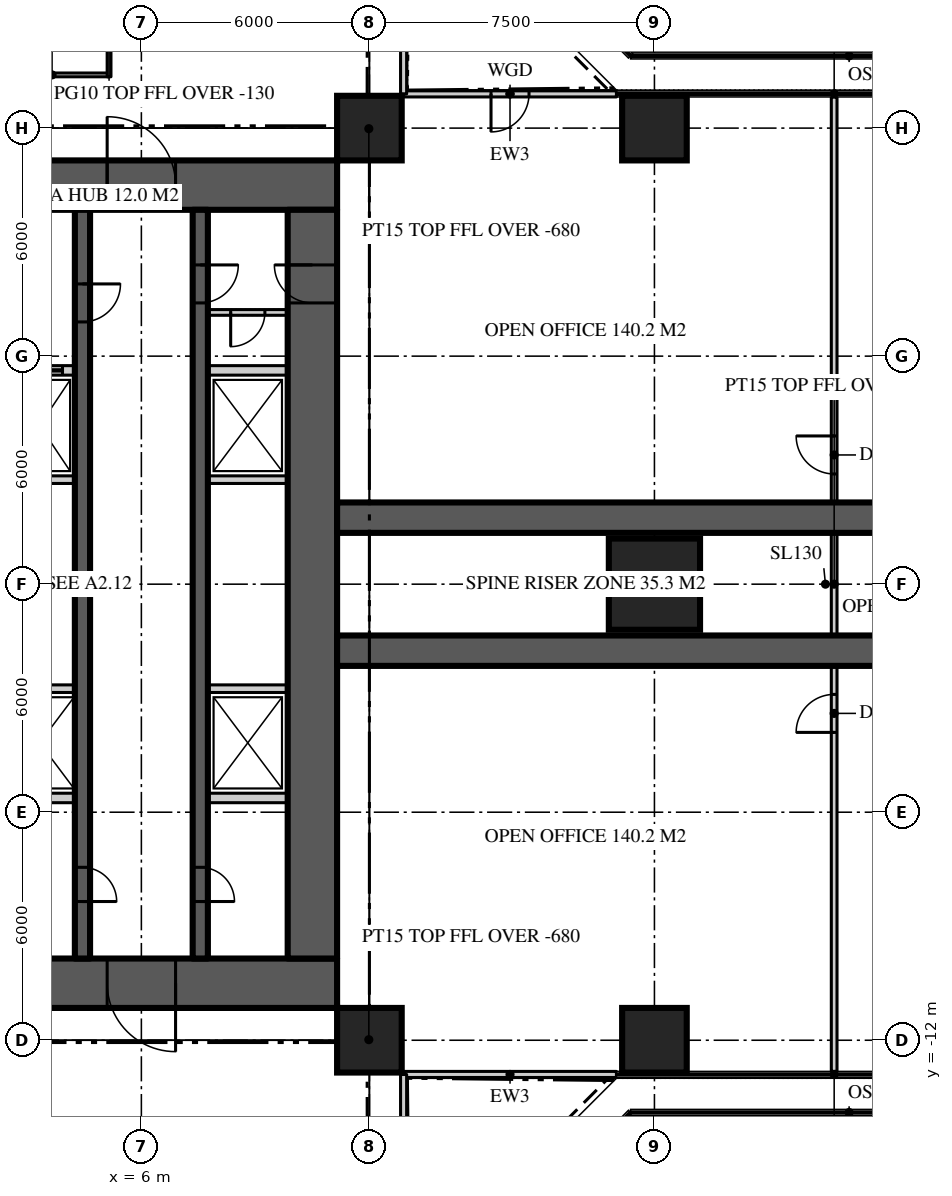
"""IFC4 building model, lengths in metres.
Left out: names, types, materials, properties, quantities, classifications, styles, units other than length and angle.
Written with IfcOpenShell. Run it as: python <this file> out.ifc"""

import sys

from ifc_helpers import new_model, si_unit, direction, frame, frame_2d, origin, origin_2d, place, context, subcontext, project, spatial, rectangle, extrude, element, fill, save


model = new_model("IFC4")
c1 = context("Model", 3, precision=1e-05, world=origin(), true_north=direction((0.0, 1.0)))
c2 = subcontext(c1, "Body", "Model", "MODEL_VIEW")
j1 = project(units=[si_unit("LENGTHUNIT", "METRE"), si_unit("PLANEANGLEUNIT", "RADIAN")], contexts=[c1])
p1 = place(None, origin())
s1 = spatial("IfcSite", under=j1, at=p1, CompositionType="ELEMENT")
p2 = place(p1, origin())
s2 = spatial("IfcBuilding", under=s1, at=p2, CompositionType="ELEMENT")
p3 = place(p2, frame((0.0, 0.0, 70.8)))
s3 = spatial("IfcBuildingStorey", under=s2, at=p3, CompositionType="ELEMENT", Elevation=70.8)
p4 = place(p3, frame((-11.15, 10.5, 0.0), z_axis=(0.0, 0.0, 1.0), x_axis=(1.0, 0.0, 0.0)))
e1 = element("IfcWall", 1, at=p4, inside=s3, PredefinedType="SHEAR", context=c2, shape_type="SweptSolid", body=[
    extrude(rectangle(XDim=22.3, YDim=1.3, at=frame_2d((11.15, 0.0))), origin(), (0.0, 0.0, 1.0), 3.9),
])
p5 = place(p4, frame((4.25, 0.0, 0.0)))
e2 = element("IfcOpeningElement", 2, at=p5, cuts=e1, PredefinedType="OPENING", context=c2, shape_type="SweptSolid", body=[
    extrude(rectangle(XDim=1.8, YDim=2.2, at=frame_2d((0.9, 1.1))), frame((0.0, 0.66, 0.0), z_axis=(0.0, -1.0, 0.0), x_axis=(1.0, 0.0, 0.0)), (0.0, 0.0, 1.0), 1.32),
])
p6 = place(p4, frame((16.25, 0.0, 0.0)))
e3 = element("IfcOpeningElement", 3, at=p6, cuts=e1, PredefinedType="OPENING", context=c2, shape_type="SweptSolid", body=[
    extrude(rectangle(XDim=1.8, YDim=2.2, at=frame_2d((0.9, 1.1))), frame((0.0, 0.66, 0.0), z_axis=(0.0, -1.0, 0.0), x_axis=(1.0, 0.0, 0.0)), (0.0, 0.0, 1.0), 1.32),
])
p7 = place(p3, frame((11.15, -10.5, 0.0), z_axis=(0.0, 0.0, 1.0), x_axis=(-1.0, 0.0, 0.0)))
e4 = element("IfcWall", 4, at=p7, inside=s3, PredefinedType="SHEAR", context=c2, shape_type="SweptSolid", body=[
    extrude(rectangle(XDim=22.3, YDim=1.3, at=frame_2d((11.15, 0.0))), origin(), (0.0, 0.0, 1.0), 3.9),
])
p8 = place(p7, frame((16.25, 0.0, 0.0)))
e5 = element("IfcOpeningElement", 5, at=p8, cuts=e4, PredefinedType="OPENING", context=c2, shape_type="SweptSolid", body=[
    extrude(rectangle(XDim=1.8, YDim=2.2, at=frame_2d((0.9, 1.1))), frame((0.0, 0.66, 0.0), z_axis=(0.0, -1.0, 0.0), x_axis=(1.0, 0.0, 0.0)), (0.0, 0.0, 1.0), 1.32),
])
p9 = place(p7, frame((4.25, 0.0, 0.0)))
e6 = element("IfcOpeningElement", 6, at=p9, cuts=e4, PredefinedType="OPENING", context=c2, shape_type="SweptSolid", body=[
    extrude(rectangle(XDim=1.8, YDim=2.2, at=frame_2d((0.9, 1.1))), frame((0.0, 0.66, 0.0), z_axis=(0.0, -1.0, 0.0), x_axis=(1.0, 0.0, 0.0)), (0.0, 0.0, 1.0), 1.32),
])
p10 = place(p3, frame((10.5, -9.85, 0.0), z_axis=(0.0, 0.0, 1.0), x_axis=(0.0, 1.0, 0.0)))
e7 = element("IfcWall", 7, at=p10, inside=s3, PredefinedType="SHEAR", context=c2, shape_type="SweptSolid", body=[
    extrude(rectangle(XDim=19.7, YDim=1.3, at=frame_2d((9.85, 0.0))), origin(), (0.0, 0.0, 1.0), 3.9),
])
p11 = place(p10, frame((17.25, 0.0, 0.0)))
e8 = element("IfcOpeningElement", 8, at=p11, cuts=e7, PredefinedType="OPENING", context=c2, shape_type="SweptSolid", body=[
    extrude(rectangle(XDim=1.0, YDim=2.2, at=frame_2d((0.5, 1.1))), frame((0.0, 0.66, 0.0), z_axis=(0.0, -1.0, 0.0), x_axis=(1.0, 0.0, 0.0)), (0.0, 0.0, 1.0), 1.32),
])
for number, where, z_axis, x_axis in (
    (9, (11.15, -1.75, 0.0), (0.0, 0.0, 1.0), (1.0, 0.0, 0.0)),
    (10, (11.15, 1.75, 0.0), (0.0, 0.0, 1.0), (1.0, 0.0, 0.0)),
):
    element("IfcWall", number, at=place(p3, frame(where, z_axis=z_axis, x_axis=x_axis)), inside=s3, PredefinedType="SHEAR", context=c2, shape_type="SweptSolid", body=[
        extrude(rectangle(XDim=15.25, YDim=0.8, at=frame_2d((7.625, 0.0))), origin(), (0.0, 0.0, 1.0), 3.9),
    ])
for number, where, z_axis, x_axis in (
    (11, (12.0, -12.0, 0.0), (0.0, 0.0, 1.0), (1.0, 0.0, 0.0)),
    (12, (19.5, -12.0, 0.0), (0.0, 0.0, 1.0), (1.0, 0.0, 0.0)),
):
    element("IfcColumn", number, at=place(p3, frame(where, z_axis=z_axis, x_axis=x_axis)), inside=s3, PredefinedType="COLUMN", context=c2, shape_type="SweptSolid", body=[
        extrude(rectangle(XDim=1.7, YDim=1.7, at=origin_2d()), origin(), (0.0, 0.0, 1.0), 3.9),
    ])
p12 = place(p3, frame((19.5, 0.0, 0.0), z_axis=(0.0, 0.0, 1.0), x_axis=(1.0, 0.0, 0.0)))
e13 = element("IfcColumn", 13, at=p12, inside=s3, PredefinedType="COLUMN", context=c2, shape_type="SweptSolid", body=[
    extrude(rectangle(XDim=2.4, YDim=2.4, at=origin_2d()), origin(), (0.0, 0.0, 1.0), 3.9),
])
for number, where, z_axis, x_axis in (
    (14, (12.0, 12.0, 0.0), (0.0, 0.0, 1.0), (1.0, 0.0, 0.0)),
    (15, (19.5, 12.0, 0.0), (0.0, 0.0, 1.0), (1.0, 0.0, 0.0)),
):
    element("IfcColumn", number, at=place(p3, frame(where, z_axis=z_axis, x_axis=x_axis)), inside=s3, PredefinedType="COLUMN", context=c2, shape_type="SweptSolid", body=[
        extrude(rectangle(XDim=1.7, YDim=1.7, at=origin_2d()), origin(), (0.0, 0.0, 1.0), 3.9),
    ])
p13 = place(p3, frame((12.9, -12.9, 0.0), z_axis=(0.0, 0.0, 1.0), x_axis=(1.0, 0.0, 0.0)))
e16 = element("IfcWall", 16, at=p13, inside=s3, PredefinedType="SOLIDWALL", context=c2, shape_type="SweptSolid", body=[
    extrude(rectangle(XDim=5.6, YDim=0.16, at=frame_2d((2.8, 0.0))), origin(), (0.0, 0.0, 1.0), 3.77),
])
p14 = place(p3, frame((18.5, 12.9, 0.0), z_axis=(0.0, 0.0, 1.0), x_axis=(-1.0, 0.0, 0.0)))
e17 = element("IfcWall", 17, at=p14, inside=s3, PredefinedType="SOLIDWALL", context=c2, shape_type="SweptSolid", body=[
    extrude(rectangle(XDim=5.6, YDim=0.16, at=frame_2d((2.8, 0.0))), origin(), (0.0, 0.0, 1.0), 3.77),
])
p15 = place(p14, frame((2.3, 0.0, 0.0)))
e18 = element("IfcOpeningElement", 18, at=p15, cuts=e17, PredefinedType="OPENING", context=c2, shape_type="SweptSolid", body=[
    extrude(rectangle(XDim=1.0, YDim=2.2, at=frame_2d((0.5, 1.1))), frame((0.0, 0.09, 0.0), z_axis=(0.0, -1.0, 0.0), x_axis=(1.0, 0.0, 0.0)), (0.0, 0.0, 1.0), 0.18),
])
p16 = place(p3, frame((12.9, 12.9, 0.0), z_axis=(0.0, 0.0, 1.0), x_axis=(0.0, 1.0, 0.0)))
e19 = element("IfcWall", 19, at=p16, inside=s3, PredefinedType="SOLIDWALL", context=c2, shape_type="SweptSolid", body=[
    extrude(rectangle(XDim=5.6, YDim=0.16, at=frame_2d((2.8, 0.0))), origin(), (0.0, 0.0, 1.0), 3.77),
])
p17 = place(p3, frame((12.9, -18.5, 0.0), z_axis=(0.0, 0.0, 1.0), x_axis=(0.0, 1.0, 0.0)))
e20 = element("IfcWall", 20, at=p17, inside=s3, PredefinedType="SOLIDWALL", context=c2, shape_type="SweptSolid", body=[
    extrude(rectangle(XDim=5.6, YDim=0.16, at=frame_2d((2.8, 0.0))), origin(), (0.0, 0.0, 1.0), 3.77),
])
p18 = place(p17, frame((2.3, 0.0, 0.0)))
e21 = element("IfcOpeningElement", 21, at=p18, cuts=e20, PredefinedType="OPENING", context=c2, shape_type="SweptSolid", body=[
    extrude(rectangle(XDim=1.0, YDim=2.2, at=frame_2d((0.5, 1.1))), frame((0.0, 0.09, 0.0), z_axis=(0.0, -1.0, 0.0), x_axis=(1.0, 0.0, 0.0)), (0.0, 0.0, 1.0), 0.18),
])
p19 = place(p3, frame((7.55, 9.85, 0.0), z_axis=(0.0, 0.0, 1.0), x_axis=(0.0, -1.0, 0.0)))
e22 = element("IfcWall", 22, at=p19, inside=s3, PredefinedType="SHEAR", context=c2, shape_type="SweptSolid", body=[
    extrude(rectangle(XDim=19.7, YDim=0.4, at=frame_2d((9.85, 0.0))), origin(), (0.0, 0.0, 1.0), 3.9),
])
p20 = place(p19, frame((1.45, 0.0, 0.0)))
e23 = element("IfcOpeningElement", 23, at=p20, cuts=e22, PredefinedType="OPENING", context=c2, shape_type="SweptSolid", body=[
    extrude(rectangle(XDim=1.0, YDim=2.2, at=frame_2d((0.5, 1.1))), frame((0.0, 0.21, 0.0), z_axis=(0.0, -1.0, 0.0), x_axis=(1.0, 0.0, 0.0)), (0.0, 0.0, 1.0), 0.42),
])
p21 = place(p19, frame((17.3, 0.0, 0.0)))
e24 = element("IfcOpeningElement", 24, at=p21, cuts=e22, PredefinedType="OPENING", context=c2, shape_type="SweptSolid", body=[
    extrude(rectangle(XDim=0.9, YDim=2.1, at=frame_2d((0.45, 1.05))), frame((0.0, 0.21, 0.0), z_axis=(0.0, -1.0, 0.0), x_axis=(1.0, 0.0, 0.0)), (0.0, 0.0, 1.0), 0.42),
])
p22 = place(p3, frame((4.45, 9.85, 0.0), z_axis=(0.0, 0.0, 1.0), x_axis=(0.0, -1.0, 0.0)))
e25 = element("IfcWall", 25, at=p22, inside=s3, PredefinedType="SHEAR", context=c2, shape_type="SweptSolid", body=[
    extrude(rectangle(XDim=19.7, YDim=0.4, at=frame_2d((9.85, 0.0))), origin(), (0.0, 0.0, 1.0), 3.9),
])
p23 = place(p22, frame((1.95, 0.0, 0.0)))
e26 = element("IfcOpeningElement", 26, at=p23, cuts=e25, PredefinedType="OPENING", context=c2, shape_type="SweptSolid", body=[
    extrude(rectangle(XDim=1.0, YDim=2.2, at=frame_2d((0.5, 1.1))), frame((0.0, 0.21, 0.0), z_axis=(0.0, -1.0, 0.0), x_axis=(1.0, 0.0, 0.0)), (0.0, 0.0, 1.0), 0.42),
])
p24 = place(p22, frame((17.3, 0.0, 0.0)))
e27 = element("IfcOpeningElement", 27, at=p24, cuts=e25, PredefinedType="OPENING", context=c2, shape_type="SweptSolid", body=[
    extrude(rectangle(XDim=0.9, YDim=2.1, at=frame_2d((0.45, 1.05))), frame((0.0, 0.21, 0.0), z_axis=(0.0, -1.0, 0.0), x_axis=(1.0, 0.0, 0.0)), (0.0, 0.0, 1.0), 0.42),
])
p25 = place(p3, frame((2.4, 5.625, 0.0), z_axis=(0.0, 0.0, 1.0), x_axis=(1.0, 0.0, 0.0)))
e28 = element("IfcWall", 28, at=p25, inside=s3, PredefinedType="SOLIDWALL", context=c2, shape_type="SweptSolid", body=[
    extrude(rectangle(XDim=1.85, YDim=0.25, at=frame_2d((0.925, 0.0))), origin(), (0.0, 0.0, 1.0), 3.7),
])
p26 = place(p25, frame((0.325, 0.0, 0.0)))
e29 = element("IfcOpeningElement", 29, at=p26, cuts=e28, PredefinedType="OPENING", context=c2, shape_type="SweptSolid", body=[
    extrude(rectangle(XDim=1.2, YDim=2.2, at=frame_2d((0.6, 1.1))), frame((0.0, 0.135, 0.0), z_axis=(0.0, -1.0, 0.0), x_axis=(1.0, 0.0, 0.0)), (0.0, 0.0, 1.0), 0.27),
])
p27 = place(p3, frame((7.75, 5.625, 0.0), z_axis=(0.0, 0.0, 1.0), x_axis=(1.0, 0.0, 0.0)))
e30 = element("IfcWall", 30, at=p27, inside=s3, PredefinedType="SOLIDWALL", context=c2, shape_type="SweptSolid", body=[
    extrude(rectangle(XDim=2.1, YDim=0.25, at=frame_2d((1.05, 0.0))), origin(), (0.0, 0.0, 1.0), 3.7),
])
p28 = place(p3, frame((2.4, -5.625, 0.0), z_axis=(0.0, 0.0, 1.0), x_axis=(1.0, 0.0, 0.0)))
e31 = element("IfcWall", 31, at=p28, inside=s3, PredefinedType="SOLIDWALL", context=c2, shape_type="SweptSolid", body=[
    extrude(rectangle(XDim=1.85, YDim=0.25, at=frame_2d((0.925, 0.0))), origin(), (0.0, 0.0, 1.0), 3.7),
])
p29 = place(p3, frame((7.75, -5.625, 0.0), z_axis=(0.0, 0.0, 1.0), x_axis=(1.0, 0.0, 0.0)))
e32 = element("IfcWall", 32, at=p29, inside=s3, PredefinedType="SOLIDWALL", context=c2, shape_type="SweptSolid", body=[
    extrude(rectangle(XDim=2.1, YDim=0.25, at=frame_2d((1.05, 0.0))), origin(), (0.0, 0.0, 1.0), 3.7),
])
p30 = place(p3, frame((2.4, -2.75, 0.0), z_axis=(0.0, 0.0, 1.0), x_axis=(1.0, 0.0, 0.0)))
e33 = element("IfcWall", 33, at=p30, inside=s3, PredefinedType="SOLIDWALL", context=c2, shape_type="SweptSolid", body=[
    extrude(rectangle(XDim=1.85, YDim=0.2, at=frame_2d((0.925, 0.0))), origin(), (0.0, 0.0, 1.0), 3.7),
])
p31 = place(p3, frame((7.75, -2.75, 0.0), z_axis=(0.0, 0.0, 1.0), x_axis=(1.0, 0.0, 0.0)))
e34 = element("IfcWall", 34, at=p31, inside=s3, PredefinedType="SOLIDWALL", context=c2, shape_type="SweptSolid", body=[
    extrude(rectangle(XDim=2.1, YDim=0.2, at=frame_2d((1.05, 0.0))), origin(), (0.0, 0.0, 1.0), 3.7),
])
p32 = place(p3, frame((2.4, 2.75, 0.0), z_axis=(0.0, 0.0, 1.0), x_axis=(1.0, 0.0, 0.0)))
e35 = element("IfcWall", 35, at=p32, inside=s3, PredefinedType="SOLIDWALL", context=c2, shape_type="SweptSolid", body=[
    extrude(rectangle(XDim=1.85, YDim=0.2, at=frame_2d((0.925, 0.0))), origin(), (0.0, 0.0, 1.0), 3.7),
])
p33 = place(p3, frame((7.75, 2.75, 0.0), z_axis=(0.0, 0.0, 1.0), x_axis=(1.0, 0.0, 0.0)))
e36 = element("IfcWall", 36, at=p33, inside=s3, PredefinedType="SOLIDWALL", context=c2, shape_type="SweptSolid", body=[
    extrude(rectangle(XDim=2.1, YDim=0.2, at=frame_2d((1.05, 0.0))), origin(), (0.0, 0.0, 1.0), 3.7),
])
p34 = place(p3, frame((24.229, -12.82, 0.0), z_axis=(0.0, 0.0, 1.0), x_axis=(0.0, 1.0, 0.0)))
e37 = element("IfcWall", 37, at=p34, inside=s3, PredefinedType="PARTITIONING", context=c2, shape_type="SweptSolid", body=[
    extrude(rectangle(XDim=25.64, YDim=0.15, at=frame_2d((12.82, 0.0))), origin(), (0.0, 0.0, 1.0), 3.77),
])
p35 = place(p34, frame((15.72, 0.0, 0.0)))
e38 = element("IfcOpeningElement", 38, at=p35, cuts=e37, PredefinedType="OPENING", context=c2, shape_type="SweptSolid", body=[
    extrude(rectangle(XDim=1.0, YDim=2.2, at=frame_2d((0.5, 1.1))), frame((0.0, 0.085, 0.0), z_axis=(0.0, -1.0, 0.0), x_axis=(1.0, 0.0, 0.0)), (0.0, 0.0, 1.0), 0.17),
])
p36 = place(p34, frame((8.92, 0.0, 0.0)))
e39 = element("IfcOpeningElement", 39, at=p36, cuts=e37, PredefinedType="OPENING", context=c2, shape_type="SweptSolid", body=[
    extrude(rectangle(XDim=1.0, YDim=2.2, at=frame_2d((0.5, 1.1))), frame((0.0, 0.085, 0.0), z_axis=(0.0, -1.0, 0.0), x_axis=(1.0, 0.0, 0.0)), (0.0, 0.0, 1.0), 0.17),
])
p37 = place(p3, frame((2.15, 13.4, 0.0), z_axis=(0.0, 0.0, 1.0), x_axis=(1.0, 0.0, 0.0)))
e40 = element("IfcWall", 40, at=p37, inside=s3, PredefinedType="PARTITIONING", context=c2, shape_type="SweptSolid", body=[
    extrude(rectangle(XDim=3.0, YDim=0.1, at=frame_2d((1.5, 0.0))), origin(), (0.0, 0.0, 1.0), 3.77),
])
p38 = place(p3, frame((5.15, 13.35, 0.0), z_axis=(0.0, 0.0, 1.0), x_axis=(0.0, 1.0, 0.0)))
e41 = element("IfcWall", 41, at=p38, inside=s3, PredefinedType="PARTITIONING", context=c2, shape_type="SweptSolid", body=[
    extrude(rectangle(XDim=4.1, YDim=0.1, at=frame_2d((2.05, 0.0))), origin(), (0.0, 0.0, 1.0), 3.77),
])
p39 = place(p38, frame((1.55, 0.0, 0.0)))
e42 = element("IfcOpeningElement", 42, at=p39, cuts=e41, PredefinedType="OPENING", context=c2, shape_type="SweptSolid", body=[
    extrude(rectangle(XDim=1.0, YDim=2.2, at=frame_2d((0.5, 1.1))), frame((0.0, 0.06, 0.0), z_axis=(0.0, -1.0, 0.0), x_axis=(1.0, 0.0, 0.0)), (0.0, 0.0, 1.0), 0.12),
])
for number, where, z_axis, x_axis in (
    (43, (11.15, 11.15, 0.0), (0.0, 0.0, 1.0), (0.707, 0.707, 0.0)),
    (44, (11.15, -11.15, 0.0), (0.0, 0.0, 1.0), (0.707, -0.707, 0.0)),
):
    element("IfcWall", number, at=place(p3, frame(where, z_axis=z_axis, x_axis=x_axis)), inside=s3, PredefinedType="PARTITIONING", context=c2, shape_type="SweptSolid", body=[
        extrude(rectangle(XDim=2.362, YDim=0.15, at=frame_2d((1.181, 0.0))), origin(), (0.0, 0.0, 1.0), 3.22),
    ])
p40 = place(p3, frame((9.85, 7.15, 0.0), z_axis=(0.0, 0.0, 1.0), x_axis=(-1.0, 0.0, 0.0)))
e45 = element("IfcWall", 45, at=p40, inside=s3, PredefinedType="SOLIDWALL", context=c2, shape_type="SweptSolid", body=[
    extrude(rectangle(XDim=2.1, YDim=0.15, at=frame_2d((1.05, 0.0))), origin(), (0.0, 0.0, 1.0), 3.77),
])
p41 = place(p40, frame((0.6, 0.0, 0.0)))
e46 = element("IfcOpeningElement", 46, at=p41, cuts=e45, PredefinedType="OPENING", context=c2, shape_type="SweptSolid", body=[
    extrude(rectangle(XDim=0.9, YDim=2.1, at=frame_2d((0.45, 1.05))), frame((0.0, 0.085, 0.0), z_axis=(0.0, -1.0, 0.0), x_axis=(1.0, 0.0, 0.0)), (0.0, 0.0, 1.0), 0.17),
])
p42 = place(p15, origin())
e47 = element("IfcDoor", 47, at=p42, inside=s3, OperationType="SINGLE_SWING_RIGHT", PredefinedType="DOOR", context=c2, shape_type="SweptSolid", body=[
    extrude(rectangle(XDim=1.0, YDim=2.2, at=frame_2d((0.5, 1.1))), frame((0.0, 0.025, 0.0), z_axis=(0.0, -1.0, 0.0), x_axis=(1.0, 0.0, 0.0)), (0.0, 0.0, 1.0), 0.05),
])
fill(e18, e47)
p43 = place(p6, origin())
e48 = element("IfcDoor", 48, at=p43, inside=s3, OperationType="DOUBLE_DOOR_DOUBLE_SWING", PredefinedType="DOOR", context=c2, shape_type="SweptSolid", body=[
    extrude(rectangle(XDim=1.8, YDim=2.2, at=frame_2d((0.9, 1.1))), frame((0.0, 0.025, 0.0), z_axis=(0.0, -1.0, 0.0), x_axis=(1.0, 0.0, 0.0)), (0.0, 0.0, 1.0), 0.05),
])
fill(e3, e48)
p44 = place(p9, origin())
e49 = element("IfcDoor", 49, at=p44, inside=s3, OperationType="DOUBLE_DOOR_DOUBLE_SWING", PredefinedType="DOOR", context=c2, shape_type="SweptSolid", body=[
    extrude(rectangle(XDim=1.8, YDim=2.2, at=frame_2d((0.9, 1.1))), frame((0.0, 0.025, 0.0), z_axis=(0.0, -1.0, 0.0), x_axis=(1.0, 0.0, 0.0)), (0.0, 0.0, 1.0), 0.05),
])
fill(e6, e49)
p45 = place(p20, origin())
e50 = element("IfcDoor", 50, at=p45, inside=s3, OperationType="SINGLE_SWING_LEFT", PredefinedType="DOOR", context=c2, shape_type="SweptSolid", body=[
    extrude(rectangle(XDim=1.0, YDim=2.2, at=frame_2d((0.5, 1.1))), frame((0.0, 0.025, 0.0), z_axis=(0.0, -1.0, 0.0), x_axis=(1.0, 0.0, 0.0)), (0.0, 0.0, 1.0), 0.05),
])
fill(e23, e50)
p46 = place(p11, origin())
e51 = element("IfcDoor", 51, at=p46, inside=s3, OperationType="SINGLE_SWING_RIGHT", PredefinedType="DOOR", context=c2, shape_type="SweptSolid", body=[
    extrude(rectangle(XDim=1.0, YDim=2.2, at=frame_2d((0.5, 1.1))), frame((0.0, 0.025, 0.0), z_axis=(0.0, -1.0, 0.0), x_axis=(1.0, 0.0, 0.0)), (0.0, 0.0, 1.0), 0.05),
])
fill(e8, e51)
p47 = place(p23, origin())
e52 = element("IfcDoor", 52, at=p47, inside=s3, OperationType="SINGLE_SWING_LEFT", PredefinedType="DOOR", context=c2, shape_type="SweptSolid", body=[
    extrude(rectangle(XDim=1.0, YDim=2.2, at=frame_2d((0.5, 1.1))), frame((0.0, 0.025, 0.0), z_axis=(0.0, -1.0, 0.0), x_axis=(1.0, 0.0, 0.0)), (0.0, 0.0, 1.0), 0.05),
])
fill(e26, e52)
p48 = place(p21, origin())
e53 = element("IfcDoor", 53, at=p48, inside=s3, OperationType="SINGLE_SWING_RIGHT", PredefinedType="DOOR", context=c2, shape_type="SweptSolid", body=[
    extrude(rectangle(XDim=0.9, YDim=2.1, at=frame_2d((0.45, 1.05))), frame((0.0, 0.025, 0.0), z_axis=(0.0, -1.0, 0.0), x_axis=(1.0, 0.0, 0.0)), (0.0, 0.0, 1.0), 0.05),
])
fill(e24, e53)
p49 = place(p24, origin())
e54 = element("IfcDoor", 54, at=p49, inside=s3, OperationType="SINGLE_SWING_RIGHT", PredefinedType="DOOR", context=c2, shape_type="SweptSolid", body=[
    extrude(rectangle(XDim=0.9, YDim=2.1, at=frame_2d((0.45, 1.05))), frame((0.0, 0.025, 0.0), z_axis=(0.0, -1.0, 0.0), x_axis=(1.0, 0.0, 0.0)), (0.0, 0.0, 1.0), 0.05),
])
fill(e27, e54)
p50 = place(p26, origin())
e55 = element("IfcDoor", 55, at=p50, inside=s3, OperationType="SLIDING_TO_LEFT", PredefinedType="DOOR", context=c2, shape_type="SweptSolid", body=[
    extrude(rectangle(XDim=1.2, YDim=2.2, at=frame_2d((0.6, 1.1))), frame((0.0, 0.025, 0.0), z_axis=(0.0, -1.0, 0.0), x_axis=(1.0, 0.0, 0.0)), (0.0, 0.0, 1.0), 0.05),
])
fill(e29, e55)
p51 = place(p35, origin())
e56 = element("IfcDoor", 56, at=p51, inside=s3, OperationType="SINGLE_SWING_RIGHT", PredefinedType="DOOR", context=c2, shape_type="SweptSolid", body=[
    extrude(rectangle(XDim=1.0, YDim=2.2, at=frame_2d((0.5, 1.1))), frame((0.0, 0.025, 0.0), z_axis=(0.0, -1.0, 0.0), x_axis=(1.0, 0.0, 0.0)), (0.0, 0.0, 1.0), 0.05),
])
fill(e38, e56)
p52 = place(p36, origin())
e57 = element("IfcDoor", 57, at=p52, inside=s3, OperationType="SINGLE_SWING_LEFT", PredefinedType="DOOR", context=c2, shape_type="SweptSolid", body=[
    extrude(rectangle(XDim=1.0, YDim=2.2, at=frame_2d((0.5, 1.1))), frame((0.0, 0.025, 0.0), z_axis=(0.0, -1.0, 0.0), x_axis=(1.0, 0.0, 0.0)), (0.0, 0.0, 1.0), 0.05),
])
fill(e39, e57)
p53 = place(p41, origin())
e58 = element("IfcDoor", 58, at=p53, inside=s3, OperationType="SINGLE_SWING_RIGHT", PredefinedType="DOOR", context=c2, shape_type="SweptSolid", body=[
    extrude(rectangle(XDim=0.9, YDim=2.1, at=frame_2d((0.45, 1.05))), frame((0.0, 0.025, 0.0), z_axis=(0.0, -1.0, 0.0), x_axis=(1.0, 0.0, 0.0)), (0.0, 0.0, 1.0), 0.05),
])
fill(e46, e58)
save(model, sys.argv[1])
